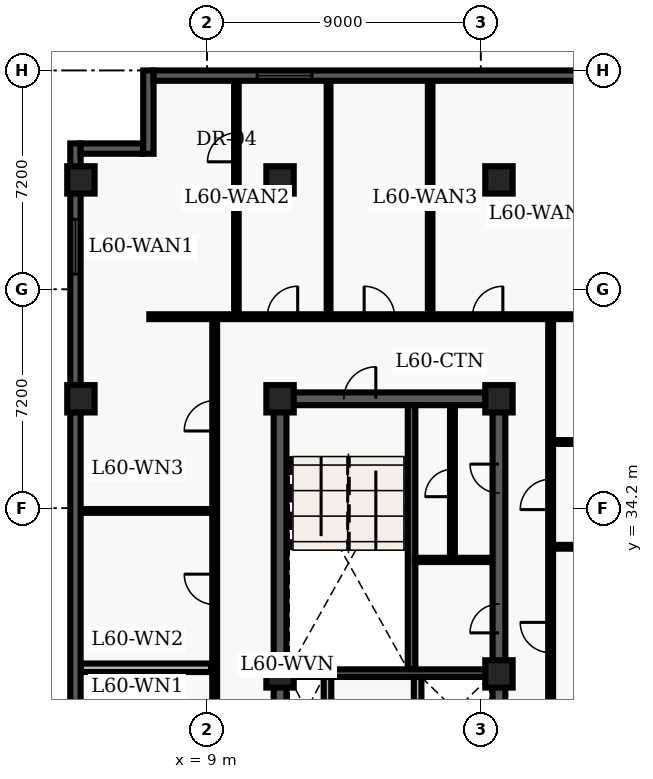
"""IFC4 building model, lengths in metres.
Left out: names, types, materials, properties, quantities, classifications, styles, units other than length and angle.
Written with IfcOpenShell. Run it as: python <this file> out.ifc"""

import sys

from ifc_helpers import new_model, entity, si_unit, converted_unit, direction, frame, origin_with_axes, origin_2d_with_axis, place, context, subcontext, project, spatial, polyline, rectangle, outline, extrude, element, fill, save


model = new_model("IFC4")
c1 = context("Model", 3, precision=1e-05, world=origin_with_axes(), true_north=direction((0.0, 1.0)))
c2 = subcontext(c1, "Body", "Model", "MODEL_VIEW")
j1 = project(units=[si_unit("LENGTHUNIT", "METRE"), converted_unit("PLANEANGLEUNIT", "DEGREE", entity("IfcPlaneAngleMeasure", 0.017), si_unit("PLANEANGLEUNIT", "RADIAN"), dimensions=[0, 0, 0, 0, 0, 0, 0])], contexts=[c1])
p1 = place(None, origin_with_axes())
s1 = spatial("IfcSite", under=j1, at=p1, CompositionType="ELEMENT")
p2 = place(p1, origin_with_axes())
s2 = spatial("IfcBuilding", under=s1, at=p2, CompositionType="ELEMENT")
p3 = place(p2, frame((0.0, 0.0, 244.2), z_axis=(0.0, 0.0, 1.0), x_axis=(1.0, 0.0, 0.0)))
s3 = spatial("IfcBuildingStorey", under=s2, at=p3, CompositionType="ELEMENT", Elevation=244.2)
p4 = place(p3, frame((11.4, 10.8, 0.0), z_axis=(0.0, 0.0, 1.0), x_axis=(0.0, 1.0, 0.0)))
e1 = element("IfcWall", 1, at=p4, inside=s3, PredefinedType="SHEAR", context=c2, shape_type="SweptSolid", body=[
    extrude(outline(polyline([(0.0, -0.21), (27.0, -0.21), (27.0, 0.21), (0.0, 0.21), (0.0, -0.21)])), origin_with_axes(), (0.0, 0.0, 1.0), 3.6),
])
p5 = place(p3, frame((11.4, 37.8, 0.0), z_axis=(0.0, 0.0, 1.0), x_axis=(1.0, 0.0, 0.0)))
e2 = element("IfcWall", 2, at=p5, inside=s3, PredefinedType="SHEAR", context=c2, shape_type="SweptSolid", body=[
    extrude(outline(polyline([(0.0, -0.21), (7.2, -0.21), (7.2, 0.21), (0.0, 0.21), (0.0, -0.21)])), origin_with_axes(), (0.0, 0.0, 1.0), 3.6),
])
p6 = place(p5, frame((2.625, 0.0, 0.0), z_axis=(0.0, 0.0, 1.0), x_axis=(1.0, 0.0, 0.0)))
e3 = element("IfcOpeningElement", 3, at=p6, cuts=e2, PredefinedType="OPENING", context=c2, shape_type="SweptSolid", body=[
    extrude(rectangle(XDim=1.05, YDim=0.44, at=origin_2d_with_axis()), origin_with_axes(), (0.0, 0.0, 1.0), 2.15),
])
p7 = place(p3, frame((18.6, 24.3, 0.0), z_axis=(0.0, 0.0, 1.0), x_axis=(0.0, 1.0, 0.0)))
e4 = element("IfcWall", 4, at=p7, inside=s3, PredefinedType="SHEAR", context=c2, shape_type="SweptSolid", body=[
    extrude(outline(polyline([(0.0, -0.21), (13.5, -0.21), (13.5, 0.21), (0.0, 0.21), (0.0, -0.21)])), origin_with_axes(), (0.0, 0.0, 1.0), 3.6),
])
p8 = place(p7, frame((6.275, 0.0, 0.0), z_axis=(0.0, 0.0, 1.0), x_axis=(1.0, 0.0, 0.0)))
e5 = element("IfcOpeningElement", 5, at=p8, cuts=e4, PredefinedType="OPENING", context=c2, shape_type="SweptSolid", body=[
    extrude(rectangle(XDim=0.95, YDim=0.44, at=origin_2d_with_axis()), origin_with_axes(), (0.0, 0.0, 1.0), 2.15),
])
p9 = place(p7, frame((10.875, 0.0, 0.0), z_axis=(0.0, 0.0, 1.0), x_axis=(1.0, 0.0, 0.0)))
e6 = element("IfcOpeningElement", 6, at=p9, cuts=e4, PredefinedType="OPENING", context=c2, shape_type="SweptSolid", body=[
    extrude(rectangle(XDim=0.95, YDim=0.44, at=origin_2d_with_axis()), origin_with_axes(), (0.0, 0.0, 1.0), 2.15),
])
p10 = place(p3, frame((15.725, 28.9, 0.0), z_axis=(0.0, 0.0, 1.0), x_axis=(0.0, 1.0, 0.0)))
e7 = element("IfcWall", 7, at=p10, inside=s3, PredefinedType="SHEAR", context=c2, shape_type="SweptSolid", body=[
    extrude(outline(polyline([(0.0, -0.125), (8.69, -0.125), (8.69, 0.125), (0.0, 0.125), (0.0, -0.125)])), origin_with_axes(), (0.0, 0.0, 1.0), 3.6),
])
p11 = place(p3, frame((11.61, 28.775, 0.0), z_axis=(0.0, 0.0, 1.0), x_axis=(1.0, 0.0, 0.0)))
e8 = element("IfcWall", 8, at=p11, inside=s3, PredefinedType="SHEAR", context=c2, shape_type="SweptSolid", body=[
    extrude(outline(polyline([(0.0, -0.125), (6.78, -0.125), (6.78, 0.125), (0.0, 0.125), (0.0, -0.125)])), origin_with_axes(), (0.0, 0.0, 1.0), 3.6),
])
for number, where, z_axis, x_axis in (
    (9, (12.96, 26.45, 0.0), (0.0, 0.0, 1.0), (0.0, 1.0, 0.0)),
    (10, (15.925, 26.45, 0.0), (0.0, 0.0, 1.0), (0.0, 1.0, 0.0)),
):
    element("IfcWall", number, at=place(p3, frame(where, z_axis=z_axis, x_axis=x_axis)), inside=s3, PredefinedType="SOLIDWALL", context=c2, shape_type="SweptSolid", body=[
        extrude(outline(polyline([(0.0, -0.125), (2.2, -0.125), (2.2, 0.125), (0.0, 0.125), (0.0, -0.125)])), origin_with_axes(), (0.0, 0.0, 1.0), 2.64),
    ])
for number, where, z_axis, x_axis in (
    (11, (11.4, 28.75, 0.0), (0.0, 0.0, 1.0), (1.0, 0.0, 0.0)),
    (12, (11.4, 37.8, 0.0), (0.0, 0.0, 1.0), (1.0, 0.0, 0.0)),
    (13, (11.4, 45.0, 0.0), (0.0, 0.0, 1.0), (1.0, 0.0, 0.0)),
    (14, (18.6, 28.75, 0.0), (0.0, 0.0, 1.0), (1.0, 0.0, 0.0)),
    (15, (18.6, 37.8, 0.0), (0.0, 0.0, 1.0), (1.0, 0.0, 0.0)),
    (16, (18.6, 45.0, 0.0), (0.0, 0.0, 1.0), (1.0, 0.0, 0.0)),
    (17, (4.85, 37.8, 0.0), (0.0, 0.0, 1.0), (1.0, 0.0, 0.0)),
    (18, (4.85, 45.0, 0.0), (0.0, 0.0, 1.0), (1.0, 0.0, 0.0)),
):
    element("IfcColumn", number, at=place(p3, frame(where, z_axis=z_axis, x_axis=x_axis)), inside=s3, PredefinedType="COLUMN", context=c2, shape_type="SweptSolid", body=[
        extrude(rectangle(XDim=0.9, YDim=0.9, at=origin_2d_with_axis()), origin_with_axes(), (0.0, 0.0, 1.0), 3.9),
    ])
p12 = place(p3, frame((15.84, 32.5, 0.0), z_axis=(0.0, 0.0, 1.0), x_axis=(1.0, 0.0, 0.0)))
e19 = element("IfcWall", 19, at=p12, inside=s3, PredefinedType="PARTITIONING", context=c2, shape_type="SweptSolid", body=[
    extrude(outline(polyline([(0.0, -0.07), (2.46, -0.07), (2.46, 0.07), (0.0, 0.07), (0.0, -0.07)])), origin_with_axes(), (0.0, 0.0, 1.0), 2.64),
])
p13 = place(p3, frame((17.07, 32.58, 0.0), z_axis=(0.0, 0.0, 1.0), x_axis=(0.0, 1.0, 0.0)))
e20 = element("IfcWall", 20, at=p13, inside=s3, PredefinedType="PARTITIONING", context=c2, shape_type="SweptSolid", body=[
    extrude(outline(polyline([(0.0, -0.08), (4.92, -0.08), (4.92, 0.08), (0.0, 0.08), (0.0, -0.08)])), origin_with_axes(), (0.0, 0.0, 1.0), 2.64),
])
p14 = place(p13, frame((2.45, 0.0, 0.0), z_axis=(0.0, 0.0, 1.0), x_axis=(1.0, 0.0, 0.0)))
e21 = element("IfcOpeningElement", 21, at=p14, cuts=e20, PredefinedType="OPENING", context=c2, shape_type="SweptSolid", body=[
    extrude(rectangle(XDim=0.9, YDim=0.18, at=origin_2d_with_axis()), origin_with_axes(), (0.0, 0.0, 1.0), 2.15),
])
p15 = place(p3, frame((7.1, 40.5, 0.0), z_axis=(0.0, 0.0, 1.0), x_axis=(1.0, 0.0, 0.0)))
e22 = element("IfcWall", 22, at=p15, inside=s3, PredefinedType="PARTITIONING", context=c2, shape_type="SweptSolid", body=[
    extrude(outline(polyline([(0.0, -0.08), (24.965, -0.08), (24.965, 0.08), (0.0, 0.08), (0.0, -0.08)])), origin_with_axes(), (0.0, 0.0, 1.0), 2.64),
])
p16 = place(p15, frame((4.38, 0.0, 0.0), z_axis=(0.0, 0.0, 1.0), x_axis=(1.0, 0.0, 0.0)))
e23 = element("IfcOpeningElement", 23, at=p16, cuts=e22, PredefinedType="OPENING", context=c2, shape_type="SweptSolid", body=[
    extrude(rectangle(XDim=1.0, YDim=0.18, at=origin_2d_with_axis()), origin_with_axes(), (0.0, 0.0, 1.0), 2.15),
])
p17 = place(p15, frame((7.566, 0.0, 0.0), z_axis=(0.0, 0.0, 1.0), x_axis=(1.0, 0.0, 0.0)))
e24 = element("IfcOpeningElement", 24, at=p17, cuts=e22, PredefinedType="OPENING", context=c2, shape_type="SweptSolid", body=[
    extrude(rectangle(XDim=1.0, YDim=0.18, at=origin_2d_with_axis()), origin_with_axes(), (0.0, 0.0, 1.0), 2.15),
])
p18 = place(p15, frame((11.129, 0.0, 0.0), z_axis=(0.0, 0.0, 1.0), x_axis=(1.0, 0.0, 0.0)))
e25 = element("IfcOpeningElement", 25, at=p18, cuts=e22, PredefinedType="OPENING", context=c2, shape_type="SweptSolid", body=[
    extrude(rectangle(XDim=1.0, YDim=0.18, at=origin_2d_with_axis()), origin_with_axes(), (0.0, 0.0, 1.0), 2.15),
])
p19 = place(p3, frame((20.3, 7.8, 0.0), z_axis=(0.0, 0.0, 1.0), x_axis=(0.0, 1.0, 0.0)))
e26 = element("IfcWall", 26, at=p19, inside=s3, PredefinedType="PARTITIONING", context=c2, shape_type="SweptSolid", body=[
    extrude(outline(polyline([(0.0, -0.08), (32.7, -0.08), (32.7, 0.08), (0.0, 0.08), (0.0, -0.08)])), origin_with_axes(), (0.0, 0.0, 1.0), 2.64),
])
p20 = place(p19, frame((17.794, 0.0, 0.0), z_axis=(0.0, 0.0, 1.0), x_axis=(1.0, 0.0, 0.0)))
e27 = element("IfcOpeningElement", 27, at=p20, cuts=e26, PredefinedType="OPENING", context=c2, shape_type="SweptSolid", body=[
    extrude(rectangle(XDim=1.0, YDim=0.18, at=origin_2d_with_axis()), origin_with_axes(), (0.0, 0.0, 1.0), 2.15),
])
p21 = place(p19, frame((22.145, 0.0, 0.0), z_axis=(0.0, 0.0, 1.0), x_axis=(1.0, 0.0, 0.0)))
e28 = element("IfcOpeningElement", 28, at=p21, cuts=e26, PredefinedType="OPENING", context=c2, shape_type="SweptSolid", body=[
    extrude(rectangle(XDim=1.0, YDim=0.18, at=origin_2d_with_axis()), origin_with_axes(), (0.0, 0.0, 1.0), 2.15),
])
p22 = place(p19, frame((26.855, 0.0, 0.0), z_axis=(0.0, 0.0, 1.0), x_axis=(1.0, 0.0, 0.0)))
e29 = element("IfcOpeningElement", 29, at=p22, cuts=e26, PredefinedType="OPENING", context=c2, shape_type="SweptSolid", body=[
    extrude(rectangle(XDim=1.0, YDim=0.18, at=origin_2d_with_axis()), origin_with_axes(), (0.0, 0.0, 1.0), 2.15),
])
p23 = place(p19, frame((5.775, 0.0, 0.0), z_axis=(0.0, 0.0, 1.0), x_axis=(1.0, 0.0, 0.0)))
e30 = element("IfcOpeningElement", 30, at=p23, cuts=e26, PredefinedType="OPENING", context=c2, shape_type="SweptSolid", body=[
    extrude(rectangle(XDim=1.05, YDim=0.18, at=origin_2d_with_axis()), origin_with_axes(), (0.0, 0.0, 1.0), 2.15),
])
p24 = place(p3, frame((9.25, 24.4, 0.0), z_axis=(0.0, 0.0, 1.0), x_axis=(0.0, 1.0, 0.0)))
e31 = element("IfcWall", 31, at=p24, inside=s3, PredefinedType="PARTITIONING", context=c2, shape_type="SweptSolid", body=[
    extrude(outline(polyline([(0.0, -0.08), (16.1, -0.08), (16.1, 0.08), (0.0, 0.08), (0.0, -0.08)])), origin_with_axes(), (0.0, 0.0, 1.0), 2.64),
])
p25 = place(p24, frame((2.316, 0.0, 0.0), z_axis=(0.0, 0.0, 1.0), x_axis=(1.0, 0.0, 0.0)))
e32 = element("IfcOpeningElement", 32, at=p25, cuts=e31, PredefinedType="OPENING", context=c2, shape_type="SweptSolid", body=[
    extrude(rectangle(XDim=1.0, YDim=0.18, at=origin_2d_with_axis()), origin_with_axes(), (0.0, 0.0, 1.0), 2.15),
])
p26 = place(p24, frame((7.131, 0.0, 0.0), z_axis=(0.0, 0.0, 1.0), x_axis=(1.0, 0.0, 0.0)))
e33 = element("IfcOpeningElement", 33, at=p26, cuts=e31, PredefinedType="OPENING", context=c2, shape_type="SweptSolid", body=[
    extrude(rectangle(XDim=1.0, YDim=0.18, at=origin_2d_with_axis()), origin_with_axes(), (0.0, 0.0, 1.0), 2.15),
])
p27 = place(p24, frame((12.841, 0.0, 0.0), z_axis=(0.0, 0.0, 1.0), x_axis=(1.0, 0.0, 0.0)))
e34 = element("IfcOpeningElement", 34, at=p27, cuts=e31, PredefinedType="OPENING", context=c2, shape_type="SweptSolid", body=[
    extrude(rectangle(XDim=1.0, YDim=0.18, at=origin_2d_with_axis()), origin_with_axes(), (0.0, 0.0, 1.0), 2.15),
])
p28 = place(p3, frame((4.835, 28.952, 0.0), z_axis=(0.0, 0.0, 1.0), x_axis=(1.0, 0.0, 0.0)))
e35 = element("IfcWall", 35, at=p28, inside=s3, PredefinedType="PARTITIONING", context=c2, shape_type="SweptSolid", body=[
    extrude(outline(polyline([(0.0, -0.14), (4.295, -0.14), (4.295, 0.14), (0.0, 0.14), (0.0, -0.14)])), origin_with_axes(), (0.0, 0.0, 1.0), 2.64),
])
p29 = place(p3, frame((4.835, 34.111, 0.0), z_axis=(0.0, 0.0, 1.0), x_axis=(1.0, 0.0, 0.0)))
e36 = element("IfcWall", 36, at=p29, inside=s3, PredefinedType="PARTITIONING", context=c2, shape_type="SweptSolid", body=[
    extrude(outline(polyline([(0.0, -0.062), (4.295, -0.062), (4.295, 0.062), (0.0, 0.062), (0.0, -0.062)])), origin_with_axes(), (0.0, 0.0, 1.0), 2.64),
])
p30 = place(p3, frame((9.964, 40.6, 0.0), z_axis=(0.0, 0.0, 1.0), x_axis=(0.0, 1.0, 0.0)))
e37 = element("IfcWall", 37, at=p30, inside=s3, PredefinedType="PARTITIONING", context=c2, shape_type="SweptSolid", body=[
    extrude(outline(polyline([(0.0, -0.075), (7.665, -0.075), (7.665, 0.075), (0.0, 0.075), (0.0, -0.075)])), origin_with_axes(), (0.0, 0.0, 1.0), 2.64),
])
p31 = place(p30, frame((5.47, 0.0, 0.0), z_axis=(0.0, 0.0, 1.0), x_axis=(1.0, 0.0, 0.0)))
e38 = element("IfcOpeningElement", 38, at=p31, cuts=e37, PredefinedType="OPENING", context=c2, shape_type="SweptSolid", body=[
    extrude(rectangle(XDim=0.95, YDim=0.17, at=origin_2d_with_axis()), origin_with_axes(), (0.0, 0.0, 1.0), 2.15),
])
p32 = place(p3, frame((12.996, 40.6, 0.0), z_axis=(0.0, 0.0, 1.0), x_axis=(0.0, 1.0, 0.0)))
e39 = element("IfcWall", 39, at=p32, inside=s3, PredefinedType="PARTITIONING", context=c2, shape_type="SweptSolid", body=[
    extrude(outline(polyline([(0.0, -0.062), (7.665, -0.062), (7.665, 0.062), (0.0, 0.062), (0.0, -0.062)])), origin_with_axes(), (0.0, 0.0, 1.0), 2.64),
])
p33 = place(p3, frame((16.337, 40.6, 0.0), z_axis=(0.0, 0.0, 1.0), x_axis=(0.0, 1.0, 0.0)))
e40 = element("IfcWall", 40, at=p33, inside=s3, PredefinedType="PARTITIONING", context=c2, shape_type="SweptSolid", body=[
    extrude(outline(polyline([(0.0, -0.075), (7.665, -0.075), (7.665, 0.075), (0.0, 0.075), (0.0, -0.075)])), origin_with_axes(), (0.0, 0.0, 1.0), 2.64),
])
p34 = place(p3, frame((20.45, 32.932, 0.0), z_axis=(0.0, 0.0, 1.0), x_axis=(1.0, 0.0, 0.0)))
e41 = element("IfcWall", 41, at=p34, inside=s3, PredefinedType="PARTITIONING", context=c2, shape_type="SweptSolid", body=[
    extrude(outline(polyline([(0.0, -0.062), (11.615, -0.062), (11.615, 0.062), (0.0, 0.062), (0.0, -0.062)])), origin_with_axes(), (0.0, 0.0, 1.0), 2.64),
])
p35 = place(p3, frame((20.45, 36.378, 0.0), z_axis=(0.0, 0.0, 1.0), x_axis=(1.0, 0.0, 0.0)))
e42 = element("IfcWall", 42, at=p35, inside=s3, PredefinedType="PARTITIONING", context=c2, shape_type="SweptSolid", body=[
    extrude(outline(polyline([(0.0, -0.062), (11.615, -0.062), (11.615, 0.062), (0.0, 0.062), (0.0, -0.062)])), origin_with_axes(), (0.0, 0.0, 1.0), 2.64),
])
p36 = place(p35, frame((3.175, 0.0, 0.0), z_axis=(0.0, 0.0, 1.0), x_axis=(1.0, 0.0, 0.0)))
e43 = element("IfcOpeningElement", 43, at=p36, cuts=e42, PredefinedType="OPENING", context=c2, shape_type="SweptSolid", body=[
    extrude(rectangle(XDim=0.95, YDim=0.145, at=origin_2d_with_axis()), origin_with_axes(), (0.0, 0.0, 1.0), 2.15),
])
p37 = place(p3, frame((4.67, 2.74, 0.0), z_axis=(0.0, 0.0, 1.0), x_axis=(0.0, 1.0, 0.0)))
e44 = element("IfcWall", 44, at=p37, inside=s3, PredefinedType="SOLIDWALL", context=c2, shape_type="SweptSolid", body=[
    extrude(outline(polyline([(0.0, -0.17), (43.46, -0.17), (43.46, 0.17), (0.0, 0.17), (0.0, -0.17)])), origin_with_axes(), (0.0, 0.0, 1.0), 3.6),
])
p38 = place(p37, frame((2.948, 0.0, 0.45), z_axis=(0.0, 0.0, 1.0), x_axis=(1.0, 0.0, 0.0)))
e45 = element("IfcOpeningElement", 45, at=p38, cuts=e44, PredefinedType="OPENING", context=c2, shape_type="SweptSolid", body=[
    extrude(rectangle(XDim=1.8, YDim=0.36, at=origin_2d_with_axis()), origin_with_axes(), (0.0, 0.0, 1.0), 2.1),
])
p39 = place(p37, frame((12.339, 0.0, 0.45), z_axis=(0.0, 0.0, 1.0), x_axis=(1.0, 0.0, 0.0)))
e46 = element("IfcOpeningElement", 46, at=p39, cuts=e44, PredefinedType="OPENING", context=c2, shape_type="SweptSolid", body=[
    extrude(rectangle(XDim=1.8, YDim=0.36, at=origin_2d_with_axis()), origin_with_axes(), (0.0, 0.0, 1.0), 2.1),
])
p40 = place(p37, frame((16.184, 0.0, 0.45), z_axis=(0.0, 0.0, 1.0), x_axis=(1.0, 0.0, 0.0)))
e47 = element("IfcOpeningElement", 47, at=p40, cuts=e44, PredefinedType="OPENING", context=c2, shape_type="SweptSolid", body=[
    extrude(rectangle(XDim=1.8, YDim=0.36, at=origin_2d_with_axis()), origin_with_axes(), (0.0, 0.0, 1.0), 2.1),
])
p41 = place(p37, frame((40.062, 0.0, 0.45), z_axis=(0.0, 0.0, 1.0), x_axis=(1.0, 0.0, 0.0)))
e48 = element("IfcOpeningElement", 48, at=p41, cuts=e44, PredefinedType="OPENING", context=c2, shape_type="SweptSolid", body=[
    extrude(rectangle(XDim=1.8, YDim=0.36, at=origin_2d_with_axis()), origin_with_axes(), (0.0, 0.0, 1.0), 2.1),
])
p42 = place(p3, frame((4.84, 46.03, 0.0), z_axis=(0.0, 0.0, 1.0), x_axis=(1.0, 0.0, 0.0)))
e49 = element("IfcWall", 49, at=p42, inside=s3, PredefinedType="SOLIDWALL", context=c2, shape_type="SweptSolid", body=[
    extrude(outline(polyline([(0.0, -0.17), (2.06, -0.17), (2.06, 0.17), (0.0, 0.17), (0.0, -0.17)])), origin_with_axes(), (0.0, 0.0, 1.0), 3.6),
])
p43 = place(p3, frame((7.07, 45.86, 0.0), z_axis=(0.0, 0.0, 1.0), x_axis=(0.0, 1.0, 0.0)))
e50 = element("IfcWall", 50, at=p43, inside=s3, PredefinedType="SOLIDWALL", context=c2, shape_type="SweptSolid", body=[
    extrude(outline(polyline([(0.0, -0.17), (2.74, -0.17), (2.74, 0.17), (0.0, 0.17), (0.0, -0.17)])), origin_with_axes(), (0.0, 0.0, 1.0), 3.6),
])
p44 = place(p3, frame((7.24, 48.43, 0.0), z_axis=(0.0, 0.0, 1.0), x_axis=(1.0, 0.0, 0.0)))
e51 = element("IfcWall", 51, at=p44, inside=s3, PredefinedType="SOLIDWALL", context=c2, shape_type="SweptSolid", body=[
    extrude(outline(polyline([(0.0, -0.17), (18.36, -0.17), (18.36, 0.17), (0.0, 0.17), (0.0, -0.17)])), origin_with_axes(), (0.0, 0.0, 1.0), 3.6),
])
p45 = place(p44, frame((4.31, 0.0, 0.45), z_axis=(0.0, 0.0, 1.0), x_axis=(1.0, 0.0, 0.0)))
e52 = element("IfcOpeningElement", 52, at=p45, cuts=e51, PredefinedType="OPENING", context=c2, shape_type="SweptSolid", body=[
    extrude(rectangle(XDim=1.8, YDim=0.36, at=origin_2d_with_axis()), origin_with_axes(), (0.0, 0.0, 1.0), 2.1),
])
p46 = place(p44, frame((14.9, 0.0, 0.45), z_axis=(0.0, 0.0, 1.0), x_axis=(1.0, 0.0, 0.0)))
e53 = element("IfcOpeningElement", 53, at=p46, cuts=e51, PredefinedType="OPENING", context=c2, shape_type="SweptSolid", body=[
    extrude(rectangle(XDim=1.8, YDim=0.36, at=origin_2d_with_axis()), origin_with_axes(), (0.0, 0.0, 1.0), 2.1),
])
p47 = place(p5, frame((2.625, 0.0, 0.0), z_axis=(0.0, 0.0, 1.0), x_axis=(1.0, 0.0, 0.0)))
e54 = element("IfcDoor", 54, at=p47, inside=s3, OperationType="SINGLE_SWING_RIGHT", PredefinedType="DOOR", context=c2, shape_type="SweptSolid", body=[
    extrude(rectangle(XDim=1.05, YDim=0.09, at=origin_2d_with_axis()), origin_with_axes(), (0.0, 0.0, 1.0), 2.15),
])
fill(e3, e54)
p48 = place(p7, frame((6.275, 0.0, 0.0), z_axis=(0.0, 0.0, 1.0), x_axis=(1.0, 0.0, 0.0)))
e55 = element("IfcDoor", 55, at=p48, inside=s3, OperationType="SINGLE_SWING_LEFT", PredefinedType="DOOR", context=c2, shape_type="SweptSolid", body=[
    extrude(rectangle(XDim=0.95, YDim=0.09, at=origin_2d_with_axis()), origin_with_axes(), (0.0, 0.0, 1.0), 2.15),
])
fill(e5, e55)
p49 = place(p13, frame((2.45, 0.0, 0.0), z_axis=(0.0, 0.0, 1.0), x_axis=(1.0, 0.0, 0.0)))
e56 = element("IfcDoor", 56, at=p49, inside=s3, OperationType="SINGLE_SWING_LEFT", PredefinedType="DOOR", context=c2, shape_type="SweptSolid", body=[
    extrude(rectangle(XDim=0.9, YDim=0.09, at=origin_2d_with_axis()), origin_with_axes(), (0.0, 0.0, 1.0), 2.15),
])
fill(e21, e56)
p50 = place(p7, frame((10.875, 0.0, 0.0), z_axis=(0.0, 0.0, 1.0), x_axis=(1.0, 0.0, 0.0)))
e57 = element("IfcDoor", 57, at=p50, inside=s3, OperationType="SINGLE_SWING_RIGHT", PredefinedType="DOOR", context=c2, shape_type="SweptSolid", body=[
    extrude(rectangle(XDim=0.95, YDim=0.09, at=origin_2d_with_axis()), origin_with_axes(), (0.0, 0.0, 1.0), 2.15),
])
fill(e6, e57)
p51 = place(p24, frame((7.131, 0.0, 0.0), z_axis=(0.0, 0.0, 1.0), x_axis=(1.0, 0.0, 0.0)))
e58 = element("IfcDoor", 58, at=p51, inside=s3, OperationType="SINGLE_SWING_RIGHT", PredefinedType="DOOR", context=c2, shape_type="SweptSolid", body=[
    extrude(rectangle(XDim=1.0, YDim=0.09, at=origin_2d_with_axis()), origin_with_axes(), (0.0, 0.0, 1.0), 2.15),
])
fill(e33, e58)
p52 = place(p24, frame((12.841, 0.0, 0.0), z_axis=(0.0, 0.0, 1.0), x_axis=(1.0, 0.0, 0.0)))
e59 = element("IfcDoor", 59, at=p52, inside=s3, OperationType="SINGLE_SWING_LEFT", PredefinedType="DOOR", context=c2, shape_type="SweptSolid", body=[
    extrude(rectangle(XDim=1.0, YDim=0.09, at=origin_2d_with_axis()), origin_with_axes(), (0.0, 0.0, 1.0), 2.15),
])
fill(e34, e59)
p53 = place(p30, frame((5.47, 0.0, 0.0), z_axis=(0.0, 0.0, 1.0), x_axis=(1.0, 0.0, 0.0)))
e60 = element("IfcDoor", 60, at=p53, inside=s3, OperationType="SINGLE_SWING_LEFT", PredefinedType="DOOR", context=c2, shape_type="SweptSolid", body=[
    extrude(rectangle(XDim=0.95, YDim=0.09, at=origin_2d_with_axis()), origin_with_axes(), (0.0, 0.0, 1.0), 2.15),
])
fill(e38, e60)
p54 = place(p15, frame((4.38, 0.0, 0.0), z_axis=(0.0, 0.0, 1.0), x_axis=(1.0, 0.0, 0.0)))
e61 = element("IfcDoor", 61, at=p54, inside=s3, OperationType="SINGLE_SWING_RIGHT", PredefinedType="DOOR", context=c2, shape_type="SweptSolid", body=[
    extrude(rectangle(XDim=1.0, YDim=0.09, at=origin_2d_with_axis()), origin_with_axes(), (0.0, 0.0, 1.0), 2.15),
])
fill(e23, e61)
p55 = place(p15, frame((7.566, 0.0, 0.0), z_axis=(0.0, 0.0, 1.0), x_axis=(1.0, 0.0, 0.0)))
e62 = element("IfcDoor", 62, at=p55, inside=s3, OperationType="SINGLE_SWING_LEFT", PredefinedType="DOOR", context=c2, shape_type="SweptSolid", body=[
    extrude(rectangle(XDim=1.0, YDim=0.09, at=origin_2d_with_axis()), origin_with_axes(), (0.0, 0.0, 1.0), 2.15),
])
fill(e24, e62)
p56 = place(p15, frame((11.129, 0.0, 0.0), z_axis=(0.0, 0.0, 1.0), x_axis=(1.0, 0.0, 0.0)))
e63 = element("IfcDoor", 63, at=p56, inside=s3, OperationType="SINGLE_SWING_RIGHT", PredefinedType="DOOR", context=c2, shape_type="SweptSolid", body=[
    extrude(rectangle(XDim=1.0, YDim=0.09, at=origin_2d_with_axis()), origin_with_axes(), (0.0, 0.0, 1.0), 2.15),
])
fill(e25, e63)
p57 = place(p19, frame((22.145, 0.0, 0.0), z_axis=(0.0, 0.0, 1.0), x_axis=(1.0, 0.0, 0.0)))
e64 = element("IfcDoor", 64, at=p57, inside=s3, OperationType="SINGLE_SWING_RIGHT", PredefinedType="DOOR", context=c2, shape_type="SweptSolid", body=[
    extrude(rectangle(XDim=1.0, YDim=0.09, at=origin_2d_with_axis()), origin_with_axes(), (0.0, 0.0, 1.0), 2.15),
])
fill(e28, e64)
p58 = place(p19, frame((26.855, 0.0, 0.0), z_axis=(0.0, 0.0, 1.0), x_axis=(1.0, 0.0, 0.0)))
e65 = element("IfcDoor", 65, at=p58, inside=s3, OperationType="SINGLE_SWING_LEFT", PredefinedType="DOOR", context=c2, shape_type="SweptSolid", body=[
    extrude(rectangle(XDim=1.0, YDim=0.09, at=origin_2d_with_axis()), origin_with_axes(), (0.0, 0.0, 1.0), 2.15),
])
fill(e29, e65)
p59 = place(p37, frame((40.062, 0.0, 0.45), z_axis=(0.0, 0.0, 1.0), x_axis=(1.0, 0.0, 0.0)))
e66 = element("IfcWindow", 66, at=p59, inside=s3, PredefinedType="WINDOW", context=c2, shape_type="SweptSolid", body=[
    extrude(rectangle(XDim=1.8, YDim=0.09, at=origin_2d_with_axis()), origin_with_axes(), (0.0, 0.0, 1.0), 2.1),
])
fill(e48, e66)
p60 = place(p44, frame((4.31, 0.0, 0.45), z_axis=(0.0, 0.0, 1.0), x_axis=(1.0, 0.0, 0.0)))
e67 = element("IfcWindow", 67, at=p60, inside=s3, PredefinedType="WINDOW", context=c2, shape_type="SweptSolid", body=[
    extrude(rectangle(XDim=1.8, YDim=0.09, at=origin_2d_with_axis()), origin_with_axes(), (0.0, 0.0, 1.0), 2.1),
])
fill(e52, e67)
save(model, sys.argv[1])
